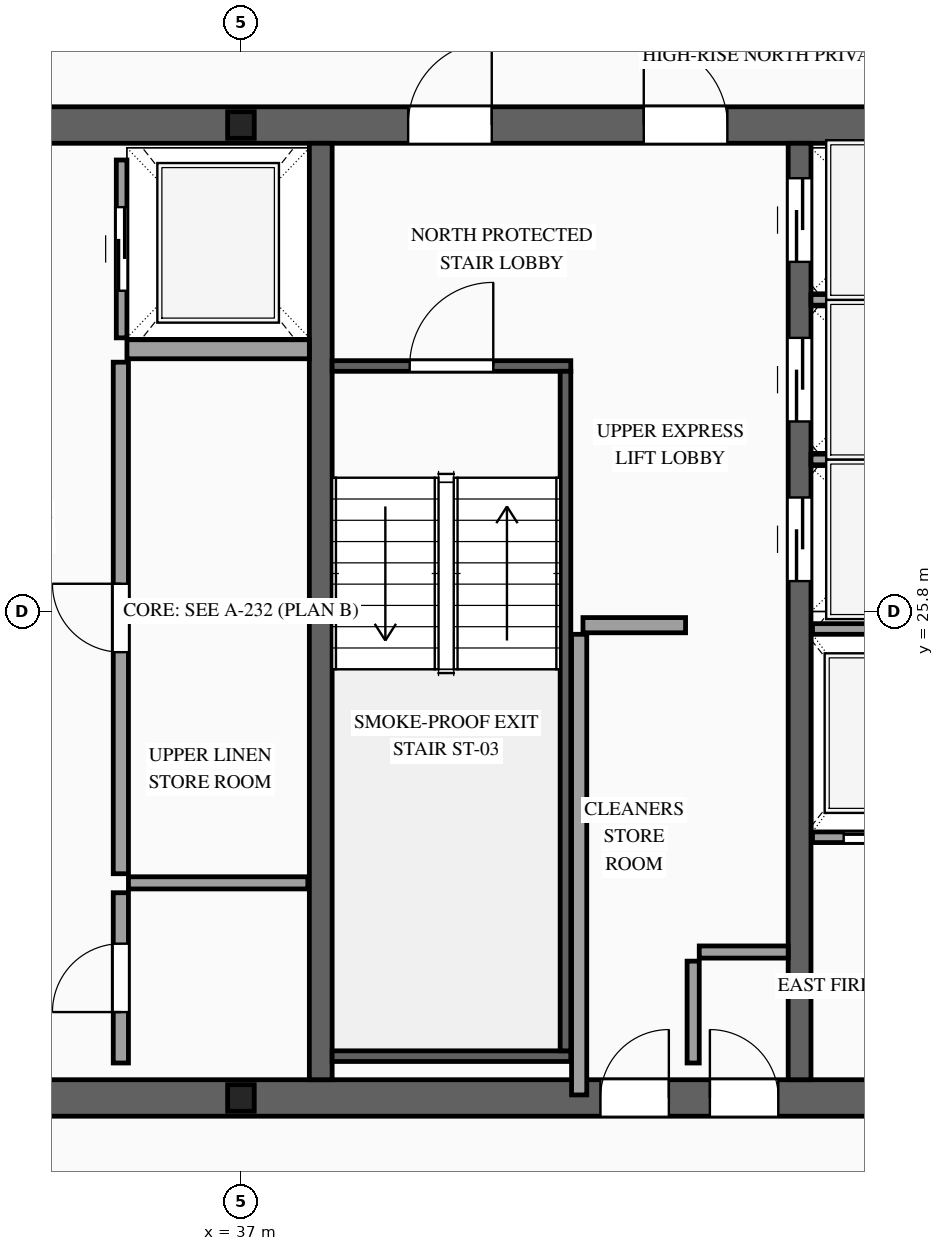
"""IFC4 building model, lengths in metres.
Left out: names, types, materials, properties, quantities, classifications, styles, units other than length and angle.
Written with IfcOpenShell. Run it as: python <this file> out.ifc"""

import sys

from ifc_helpers import new_model, si_unit, direction, frame, frame_2d, origin, origin_2d, place, context, subcontext, project, spatial, rectangle, i_section, extrude, source, transform, mapped, element, fill, save


model = new_model("IFC4")
c1 = context("Model", 3, precision=1e-05, world=origin(), true_north=direction((0.0, 1.0)))
c2 = subcontext(c1, "Body", "Model", "MODEL_VIEW")
j1 = project(units=[si_unit("LENGTHUNIT", "METRE"), si_unit("PLANEANGLEUNIT", "RADIAN")], contexts=[c1])
p1 = place(None, origin())
s1 = spatial("IfcSite", under=j1, at=p1, CompositionType="ELEMENT")
p2 = place(p1, origin())
s2 = spatial("IfcBuilding", under=s1, at=p2, CompositionType="ELEMENT")
p3 = place(p2, frame((0.0, 0.0, 296.1)))
s3 = spatial("IfcBuildingStorey", under=s2, at=p3, CompositionType="ELEMENT", Elevation=296.1)
p4 = place(p3, frame((23.56, 19.4, 0.0), z_axis=(0.0, 0.0, 1.0), x_axis=(1.0, 0.0, 0.0)))
e1 = element("IfcWall", 1, at=p4, inside=s3, PredefinedType="SHEAR", context=c2, shape_type="SweptSolid", body=[
    extrude(rectangle(XDim=26.88, YDim=0.48, at=frame_2d((13.44, 0.0))), origin(), (0.0, 0.0, 1.0), 3.5),
])
p5 = place(p4, frame((1.89, 0.0, 0.0)))
e2 = element("IfcOpeningElement", 2, at=p5, cuts=e1, PredefinedType="OPENING", context=c2, shape_type="SweptSolid", body=[
    extrude(rectangle(XDim=1.1, YDim=2.2, at=frame_2d((0.55, 1.1))), frame((0.0, 0.255, 0.0), z_axis=(0.0, -1.0, 0.0), x_axis=(1.0, 0.0, 0.0)), (0.0, 0.0, 1.0), 0.51),
])
p6 = place(p4, frame((9.79, 0.0, 0.0)))
e3 = element("IfcOpeningElement", 3, at=p6, cuts=e1, PredefinedType="OPENING", context=c2, shape_type="SweptSolid", body=[
    extrude(rectangle(XDim=1.1, YDim=2.2, at=frame_2d((0.55, 1.1))), frame((0.0, 0.255, 0.0), z_axis=(0.0, -1.0, 0.0), x_axis=(1.0, 0.0, 0.0)), (0.0, 0.0, 1.0), 0.51),
])
p7 = place(p4, frame((22.99, 0.0, 0.0)))
e4 = element("IfcOpeningElement", 4, at=p7, cuts=e1, PredefinedType="OPENING", context=c2, shape_type="SweptSolid", body=[
    extrude(rectangle(XDim=1.1, YDim=2.2, at=frame_2d((0.55, 1.1))), frame((0.0, 0.255, 0.0), z_axis=(0.0, -1.0, 0.0), x_axis=(1.0, 0.0, 0.0)), (0.0, 0.0, 1.0), 0.51),
])
p8 = place(p4, frame((19.61, 0.0, 0.0)))
e5 = element("IfcOpeningElement", 5, at=p8, cuts=e1, PredefinedType="OPENING", context=c2, shape_type="SweptSolid", body=[
    extrude(rectangle(XDim=0.9, YDim=2.15, at=frame_2d((0.45, 1.075))), frame((0.0, 0.255, 0.0), z_axis=(0.0, -1.0, 0.0), x_axis=(1.0, 0.0, 0.0)), (0.0, 0.0, 1.0), 0.51),
])
p9 = place(p4, frame((18.17, 0.0, 0.0)))
e6 = element("IfcOpeningElement", 6, at=p9, cuts=e1, PredefinedType="OPENING", context=c2, shape_type="SweptSolid", body=[
    extrude(rectangle(XDim=0.9, YDim=2.15, at=frame_2d((0.45, 1.075))), frame((0.0, 0.255, 0.0), z_axis=(0.0, -1.0, 0.0), x_axis=(1.0, 0.0, 0.0)), (0.0, 0.0, 1.0), 0.51),
])
p10 = place(p3, frame((23.56, 32.2, 0.0), z_axis=(0.0, 0.0, 1.0), x_axis=(1.0, 0.0, 0.0)))
e7 = element("IfcWall", 7, at=p10, inside=s3, PredefinedType="SHEAR", context=c2, shape_type="SweptSolid", body=[
    extrude(rectangle(XDim=26.88, YDim=0.48, at=frame_2d((13.44, 0.0))), origin(), (0.0, 0.0, 1.0), 3.5),
])
p11 = place(p10, frame((4.51, 0.0, 0.0)))
e8 = element("IfcOpeningElement", 8, at=p11, cuts=e7, PredefinedType="OPENING", context=c2, shape_type="SweptSolid", body=[
    extrude(rectangle(XDim=0.9, YDim=2.15, at=frame_2d((0.45, 1.075))), frame((0.0, 0.255, 0.0), z_axis=(0.0, -1.0, 0.0), x_axis=(1.0, 0.0, 0.0)), (0.0, 0.0, 1.0), 0.51),
])
p12 = place(p10, frame((9.79, 0.0, 0.0)))
e9 = element("IfcOpeningElement", 9, at=p12, cuts=e7, PredefinedType="OPENING", context=c2, shape_type="SweptSolid", body=[
    extrude(rectangle(XDim=1.1, YDim=2.2, at=frame_2d((0.55, 1.1))), frame((0.0, 0.255, 0.0), z_axis=(0.0, -1.0, 0.0), x_axis=(1.0, 0.0, 0.0)), (0.0, 0.0, 1.0), 0.51),
])
p13 = place(p10, frame((15.64, 0.0, 0.0)))
e10 = element("IfcOpeningElement", 10, at=p13, cuts=e7, PredefinedType="OPENING", context=c2, shape_type="SweptSolid", body=[
    extrude(rectangle(XDim=1.1, YDim=2.2, at=frame_2d((0.55, 1.1))), frame((0.0, 0.255, 0.0), z_axis=(0.0, -1.0, 0.0), x_axis=(1.0, 0.0, 0.0)), (0.0, 0.0, 1.0), 0.51),
])
p14 = place(p10, frame((18.74, 0.0, 0.0)))
e11 = element("IfcOpeningElement", 11, at=p14, cuts=e7, PredefinedType="OPENING", context=c2, shape_type="SweptSolid", body=[
    extrude(rectangle(XDim=1.1, YDim=2.2, at=frame_2d((0.55, 1.1))), frame((0.0, 0.255, 0.0), z_axis=(0.0, -1.0, 0.0), x_axis=(1.0, 0.0, 0.0)), (0.0, 0.0, 1.0), 0.51),
])
m1 = source(origin(), c2, "Body", "SweptSolid", [
    extrude(rectangle(XDim=12.32, YDim=0.3, at=frame_2d((6.16, 0.0))), origin(), (0.0, 0.0, 1.0), 3.5),
])
p15 = place(p3, frame((38.05, 19.64, 0.0), z_axis=(0.0, 0.0, 1.0), x_axis=(0.0, 1.0, 0.0)))
e12 = element("IfcWall", 12, at=p15, inside=s3, PredefinedType="SOLIDWALL", context=c2, shape_type="MappedRepresentation", body=[
    mapped(m1, transform((0.0, 0.0, 0.0), scale=1.0)),
])
p16 = place(p3, frame((44.35, 19.64, 0.0), z_axis=(0.0, 0.0, 1.0), x_axis=(0.0, 1.0, 0.0)))
e13 = element("IfcWall", 13, at=p16, inside=s3, PredefinedType="SOLIDWALL", context=c2, shape_type="SweptSolid", body=[
    extrude(rectangle(XDim=12.32, YDim=0.3, at=frame_2d((6.16, 0.0))), origin(), (0.0, 0.0, 1.0), 3.5),
])
p17 = place(p16, frame((6.56, 0.0, 0.0)))
e14 = element("IfcOpeningElement", 14, at=p17, cuts=e13, PredefinedType="OPENING", context=c2, shape_type="SweptSolid", body=[
    extrude(rectangle(XDim=1.1, YDim=2.2, at=frame_2d((0.55, 1.1))), frame((0.0, 0.165, 0.0), z_axis=(0.0, -1.0, 0.0), x_axis=(1.0, 0.0, 0.0)), (0.0, 0.0, 1.0), 0.33),
])
p18 = place(p16, frame((8.66, 0.0, 0.0)))
e15 = element("IfcOpeningElement", 15, at=p18, cuts=e13, PredefinedType="OPENING", context=c2, shape_type="SweptSolid", body=[
    extrude(rectangle(XDim=1.1, YDim=2.2, at=frame_2d((0.55, 1.1))), frame((0.0, 0.165, 0.0), z_axis=(0.0, -1.0, 0.0), x_axis=(1.0, 0.0, 0.0)), (0.0, 0.0, 1.0), 0.33),
])
p19 = place(p16, frame((10.76, 0.0, 0.0)))
e16 = element("IfcOpeningElement", 16, at=p19, cuts=e13, PredefinedType="OPENING", context=c2, shape_type="SweptSolid", body=[
    extrude(rectangle(XDim=1.1, YDim=2.2, at=frame_2d((0.55, 1.1))), frame((0.0, 0.165, 0.0), z_axis=(0.0, -1.0, 0.0), x_axis=(1.0, 0.0, 0.0)), (0.0, 0.0, 1.0), 0.33),
])
m2 = source(origin(), c2, "Body", "SweptSolid", [
    extrude(i_section(OverallWidth=0.35, OverallDepth=0.35, WebThickness=0.012, FlangeThickness=0.019, at=origin_2d()), origin(), (0.0, 0.0, 1.0), 3.5),
])
for number, where, z_axis, x_axis in (
    (17, (37.0, 19.4, 0.0), (0.0, 0.0, 1.0), (1.0, 0.0, 0.0)),
    (18, (37.0, 32.2, 0.0), (0.0, 0.0, 1.0), (1.0, 0.0, 0.0)),
):
    element("IfcColumn", number, at=place(p3, frame(where, z_axis=z_axis, x_axis=x_axis)), inside=s3, PredefinedType="COLUMN", context=c2, shape_type="MappedRepresentation", body=[
        mapped(m2, transform((0.0, 0.0, 0.0), scale=1.0)),
    ])
p20 = place(p3, frame((44.52, 22.83, 0.0), z_axis=(0.0, 0.0, 1.0), x_axis=(1.0, 0.0, 0.0)))
e19 = element("IfcWall", 19, at=p20, inside=s3, PredefinedType="SOLIDWALL", context=c2, shape_type="SweptSolid", body=[
    extrude(rectangle(XDim=1.92, YDim=0.14, at=frame_2d((0.96, 0.0))), origin(), (0.0, 0.0, 1.0), 3.28),
])
p21 = place(p20, frame((0.41, 0.0, 0.0)))
e20 = element("IfcOpeningElement", 20, at=p21, cuts=e19, PredefinedType="OPENING", context=c2, shape_type="SweptSolid", body=[
    extrude(rectangle(XDim=1.1, YDim=2.2, at=frame_2d((0.55, 1.1))), frame((0.0, 0.085, 0.0), z_axis=(0.0, -1.0, 0.0), x_axis=(1.0, 0.0, 0.0)), (0.0, 0.0, 1.0), 0.17),
])
m3 = source(origin(), c2, "Body", "SweptSolid", [
    extrude(rectangle(XDim=1.92, YDim=0.14, at=frame_2d((0.96, 0.0))), origin(), (0.0, 0.0, 1.0), 3.28),
])
p22 = place(p3, frame((44.52, 25.57, 0.0), z_axis=(0.0, 0.0, 1.0), x_axis=(1.0, 0.0, 0.0)))
e21 = element("IfcWall", 21, at=p22, inside=s3, PredefinedType="SOLIDWALL", context=c2, shape_type="MappedRepresentation", body=[
    mapped(m3, transform((0.0, 0.0, 0.0), scale=1.0)),
])
p23 = place(p3, frame((35.43, 29.4, 0.0), z_axis=(0.0, 0.0, 1.0), x_axis=(0.0, 1.0, 0.0)))
e22 = element("IfcWall", 22, at=p23, inside=s3, PredefinedType="SOLIDWALL", context=c2, shape_type="SweptSolid", body=[
    extrude(rectangle(XDim=2.34, YDim=0.14, at=frame_2d((1.17, 0.0))), origin(), (0.0, 0.0, 1.0), 3.28),
])
p24 = place(p23, frame((0.62, 0.0, 0.0)))
e23 = element("IfcOpeningElement", 23, at=p24, cuts=e22, PredefinedType="OPENING", context=c2, shape_type="SweptSolid", body=[
    extrude(rectangle(XDim=1.1, YDim=2.2, at=frame_2d((0.55, 1.1))), frame((0.0, 0.085, 0.0), z_axis=(0.0, -1.0, 0.0), x_axis=(1.0, 0.0, 0.0)), (0.0, 0.0, 1.0), 0.17),
])
m4 = source(origin(), c2, "Body", "SweptSolid", [
    extrude(rectangle(XDim=2.4, YDim=0.25, at=frame_2d((1.2, 0.0))), origin(), (0.0, 0.0, 1.0), 3.28),
])
p25 = place(p3, frame((35.5, 29.25, 0.0), z_axis=(0.0, 0.0, 1.0), x_axis=(1.0, 0.0, 0.0)))
e24 = element("IfcWall", 24, at=p25, inside=s3, PredefinedType="SOLIDWALL", context=c2, shape_type="MappedRepresentation", body=[
    mapped(m4, transform((0.0, 0.0, 0.0), scale=1.0)),
])
m5 = source(origin(), c2, "Body", "SweptSolid", [
    extrude(rectangle(XDim=2.0, YDim=0.14, at=frame_2d((1.0, 0.0))), origin(), (0.0, 0.0, 1.0), 3.28),
])
for number, where, z_axis, x_axis in (
    (25, (44.5, 27.8, 0.0), (0.0, 0.0, 1.0), (1.0, 0.0, 0.0)),
    (26, (44.5, 29.9, 0.0), (0.0, 0.0, 1.0), (1.0, 0.0, 0.0)),
):
    element("IfcWall", number, at=place(p3, frame(where, z_axis=z_axis, x_axis=x_axis)), inside=s3, PredefinedType="SOLIDWALL", context=c2, shape_type="MappedRepresentation", body=[
        mapped(m5, transform((0.0, 0.0, 0.0), scale=1.0)),
    ])
p26 = place(p3, frame((38.2, 29.03, 0.0), z_axis=(0.0, 0.0, 1.0), x_axis=(1.0, 0.0, 0.0)))
e27 = element("IfcWall", 27, at=p26, inside=s3, PredefinedType="SOLIDWALL", context=c2, shape_type="SweptSolid", body=[
    extrude(rectangle(XDim=3.14, YDim=0.14, at=frame_2d((1.57, 0.0))), origin(), (0.0, 0.0, 1.0), 3.28),
])
p27 = place(p26, frame((1.02, 0.0, 0.0)))
e28 = element("IfcOpeningElement", 28, at=p27, cuts=e27, PredefinedType="OPENING", context=c2, shape_type="SweptSolid", body=[
    extrude(rectangle(XDim=1.1, YDim=2.2, at=frame_2d((0.55, 1.1))), frame((0.0, 0.085, 0.0), z_axis=(0.0, -1.0, 0.0), x_axis=(1.0, 0.0, 0.0)), (0.0, 0.0, 1.0), 0.17),
])
m6 = source(origin(), c2, "Body", "SweptSolid", [
    extrude(rectangle(XDim=3.14, YDim=0.14, at=frame_2d((1.57, 0.0))), origin(), (0.0, 0.0, 1.0), 3.28),
])
p28 = place(p3, frame((38.2, 19.95, 0.0), z_axis=(0.0, 0.0, 1.0), x_axis=(1.0, 0.0, 0.0)))
e29 = element("IfcWall", 29, at=p28, inside=s3, PredefinedType="SOLIDWALL", context=c2, shape_type="MappedRepresentation", body=[
    mapped(m6, transform((0.0, 0.0, 0.0), scale=1.0)),
])
m7 = source(origin(), c2, "Body", "SweptSolid", [
    extrude(rectangle(XDim=8.94, YDim=0.14, at=frame_2d((4.47, 0.0))), origin(), (0.0, 0.0, 1.0), 3.28),
])
p29 = place(p3, frame((41.27, 20.02, 0.0), z_axis=(0.0, 0.0, 1.0), x_axis=(0.0, 1.0, 0.0)))
e30 = element("IfcWall", 30, at=p29, inside=s3, PredefinedType="SOLIDWALL", context=c2, shape_type="MappedRepresentation", body=[
    mapped(m7, transform((0.0, 0.0, 0.0), scale=1.0)),
])
p30 = place(p3, frame((35.42, 19.86, 0.0), z_axis=(0.0, 0.0, 1.0), x_axis=(0.0, 1.0, 0.0)))
e31 = element("IfcWall", 31, at=p30, inside=s3, PredefinedType="PARTITIONING", context=c2, shape_type="SweptSolid", body=[
    extrude(rectangle(XDim=2.24, YDim=0.2, at=frame_2d((1.12, 0.0))), origin(), (0.0, 0.0, 1.0), 3.28),
])
p31 = place(p30, frame((0.67, 0.0, 0.0)))
e32 = element("IfcOpeningElement", 32, at=p31, cuts=e31, PredefinedType="OPENING", context=c2, shape_type="SweptSolid", body=[
    extrude(rectangle(XDim=0.9, YDim=2.15, at=frame_2d((0.45, 1.075))), frame((0.0, 0.115, 0.0), z_axis=(0.0, -1.0, 0.0), x_axis=(1.0, 0.0, 0.0)), (0.0, 0.0, 1.0), 0.23),
])
p32 = place(p3, frame((35.42, 22.35, 0.0), z_axis=(0.0, 0.0, 1.0), x_axis=(0.0, 1.0, 0.0)))
e33 = element("IfcWall", 33, at=p32, inside=s3, PredefinedType="PARTITIONING", context=c2, shape_type="SweptSolid", body=[
    extrude(rectangle(XDim=6.73, YDim=0.2, at=frame_2d((3.365, 0.0))), origin(), (0.0, 0.0, 1.0), 3.28),
])
p33 = place(p32, frame((2.915, 0.0, 0.0)))
e34 = element("IfcOpeningElement", 34, at=p33, cuts=e33, PredefinedType="OPENING", context=c2, shape_type="SweptSolid", body=[
    extrude(rectangle(XDim=0.9, YDim=2.15, at=frame_2d((0.45, 1.075))), frame((0.0, 0.115, 0.0), z_axis=(0.0, -1.0, 0.0), x_axis=(1.0, 0.0, 0.0)), (0.0, 0.0, 1.0), 0.23),
])
m8 = source(origin(), c2, "Body", "SweptSolid", [
    extrude(rectangle(XDim=2.36, YDim=0.16, at=frame_2d((1.18, 0.0))), origin(), (0.0, 0.0, 1.0), 3.28),
])
p34 = place(p3, frame((35.52, 22.23, 0.0), z_axis=(0.0, 0.0, 1.0), x_axis=(1.0, 0.0, 0.0)))
e35 = element("IfcWall", 35, at=p34, inside=s3, PredefinedType="PARTITIONING", context=c2, shape_type="MappedRepresentation", body=[
    mapped(m8, transform((0.0, 0.0, 0.0), scale=1.0)),
])
m9 = source(origin(), c2, "Body", "SweptSolid", [
    extrude(rectangle(XDim=1.34, YDim=0.16, at=frame_2d((0.67, 0.0))), origin(), (0.0, 0.0, 1.0), 3.28),
])
p35 = place(p3, frame((42.95, 19.86, 0.0), z_axis=(0.0, 0.0, 1.0), x_axis=(0.0, 1.0, 0.0)))
e36 = element("IfcWall", 36, at=p35, inside=s3, PredefinedType="PARTITIONING", context=c2, shape_type="MappedRepresentation", body=[
    mapped(m9, transform((0.0, 0.0, 0.0), scale=1.0)),
])
m10 = source(origin(), c2, "Body", "SweptSolid", [
    extrude(rectangle(XDim=1.17, YDim=0.16, at=frame_2d((0.585, 0.0))), origin(), (0.0, 0.0, 1.0), 3.28),
])
p36 = place(p3, frame((43.03, 21.32, 0.0), z_axis=(0.0, 0.0, 1.0), x_axis=(1.0, 0.0, 0.0)))
e37 = element("IfcWall", 37, at=p36, inside=s3, PredefinedType="PARTITIONING", context=c2, shape_type="MappedRepresentation", body=[
    mapped(m10, transform((0.0, 0.0, 0.0), scale=1.0)),
])
m11 = source(origin(), c2, "Body", "SweptSolid", [
    extrude(rectangle(XDim=6.06, YDim=0.2, at=frame_2d((3.03, 0.0))), origin(), (0.0, 0.0, 1.0), 3.28),
])
p37 = place(p3, frame((41.45, 19.44, 0.0), z_axis=(0.0, 0.0, 1.0), x_axis=(0.0, 1.0, 0.0)))
e38 = element("IfcWall", 38, at=p37, inside=s3, PredefinedType="PARTITIONING", context=c2, shape_type="MappedRepresentation", body=[
    mapped(m11, transform((0.0, 0.0, 0.0), scale=1.0)),
])
m12 = source(origin(), c2, "Body", "SweptSolid", [
    extrude(rectangle(XDim=1.35, YDim=0.2, at=frame_2d((0.675, 0.0))), origin(), (0.0, 0.0, 1.0), 3.28),
])
p38 = place(p3, frame((41.5, 25.62, 0.0), z_axis=(0.0, 0.0, 1.0), x_axis=(1.0, 0.0, 0.0)))
e39 = element("IfcWall", 39, at=p38, inside=s3, PredefinedType="PARTITIONING", context=c2, shape_type="MappedRepresentation", body=[
    mapped(m12, transform((0.0, 0.0, 0.0), scale=1.0)),
])
m13 = source(origin(), c2, "Body", "SweptSolid", [
    extrude(rectangle(XDim=1.1, YDim=2.2, at=frame_2d((0.55, 1.1))), frame((0.0, 0.025, 0.0), z_axis=(0.0, -1.0, 0.0), x_axis=(1.0, 0.0, 0.0)), (0.0, 0.0, 1.0), 0.05),
])
p39 = place(p21, origin())
e40 = element("IfcDoor", 40, at=p39, inside=s3, OperationType="SLIDING_TO_RIGHT", PredefinedType="DOOR", context=c2, shape_type="MappedRepresentation", body=[
    mapped(m13, transform((0.0, 0.0, 0.0), scale=1.0)),
])
fill(e20, e40)
p40 = place(p24, origin())
e41 = element("IfcDoor", 41, at=p40, inside=s3, OperationType="SLIDING_TO_RIGHT", PredefinedType="DOOR", context=c2, shape_type="MappedRepresentation", body=[
    mapped(m13, transform((0.0, 0.0, 0.0), scale=1.0)),
])
fill(e23, e41)
p41 = place(p17, origin())
e42 = element("IfcDoor", 42, at=p41, inside=s3, OperationType="SLIDING_TO_LEFT", PredefinedType="DOOR", context=c2, shape_type="MappedRepresentation", body=[
    mapped(m13, transform((0.0, 0.0, 0.0), scale=1.0)),
])
fill(e14, e42)
p42 = place(p18, origin())
e43 = element("IfcDoor", 43, at=p42, inside=s3, OperationType="SLIDING_TO_RIGHT", PredefinedType="DOOR", context=c2, shape_type="MappedRepresentation", body=[
    mapped(m13, transform((0.0, 0.0, 0.0), scale=1.0)),
])
fill(e15, e43)
p43 = place(p19, origin())
e44 = element("IfcDoor", 44, at=p43, inside=s3, OperationType="SLIDING_TO_LEFT", PredefinedType="DOOR", context=c2, shape_type="MappedRepresentation", body=[
    mapped(m13, transform((0.0, 0.0, 0.0), scale=1.0)),
])
fill(e16, e44)
m14 = source(origin(), c2, "Body", "SweptSolid", [
    extrude(rectangle(XDim=1.1, YDim=2.2, at=frame_2d((0.55, 1.1))), frame((0.0, 0.025, 0.0), z_axis=(0.0, -1.0, 0.0), x_axis=(1.0, 0.0, 0.0)), (0.0, 0.0, 1.0), 0.05),
])
p44 = place(p27, origin())
e45 = element("IfcDoor", 45, at=p44, inside=s3, OperationType="SINGLE_SWING_RIGHT", PredefinedType="DOOR", context=c2, shape_type="MappedRepresentation", body=[
    mapped(m14, transform((0.0, 0.0, 0.0), scale=1.0)),
])
fill(e28, e45)
p45 = place(p13, origin())
e46 = element("IfcDoor", 46, at=p45, inside=s3, OperationType="SINGLE_SWING_RIGHT", PredefinedType="DOOR", context=c2, shape_type="MappedRepresentation", body=[
    mapped(m14, transform((0.0, 0.0, 0.0), scale=1.0)),
])
fill(e10, e46)
p46 = place(p14, origin())
e47 = element("IfcDoor", 47, at=p46, inside=s3, OperationType="SINGLE_SWING_LEFT", PredefinedType="DOOR", context=c2, shape_type="MappedRepresentation", body=[
    mapped(m14, transform((0.0, 0.0, 0.0), scale=1.0)),
])
fill(e11, e47)
m15 = source(origin(), c2, "Body", "SweptSolid", [
    extrude(rectangle(XDim=0.9, YDim=2.15, at=frame_2d((0.45, 1.075))), frame((0.0, 0.025, 0.0), z_axis=(0.0, -1.0, 0.0), x_axis=(1.0, 0.0, 0.0)), (0.0, 0.0, 1.0), 0.05),
])
p47 = place(p31, origin())
e48 = element("IfcDoor", 48, at=p47, inside=s3, OperationType="SINGLE_SWING_LEFT", PredefinedType="DOOR", context=c2, shape_type="MappedRepresentation", body=[
    mapped(m15, transform((0.0, 0.0, 0.0), scale=1.0)),
])
fill(e32, e48)
p48 = place(p33, origin())
e49 = element("IfcDoor", 49, at=p48, inside=s3, OperationType="SINGLE_SWING_RIGHT", PredefinedType="DOOR", context=c2, shape_type="MappedRepresentation", body=[
    mapped(m15, transform((0.0, 0.0, 0.0), scale=1.0)),
])
fill(e34, e49)
p49 = place(p8, origin())
e50 = element("IfcDoor", 50, at=p49, inside=s3, OperationType="SINGLE_SWING_LEFT", PredefinedType="DOOR", context=c2, shape_type="MappedRepresentation", body=[
    mapped(m15, transform((0.0, 0.0, 0.0), scale=1.0)),
])
fill(e5, e50)
p50 = place(p9, origin())
e51 = element("IfcDoor", 51, at=p50, inside=s3, OperationType="SINGLE_SWING_RIGHT", PredefinedType="DOOR", context=c2, shape_type="MappedRepresentation", body=[
    mapped(m15, transform((0.0, 0.0, 0.0), scale=1.0)),
])
fill(e6, e51)
save(model, sys.argv[1])
